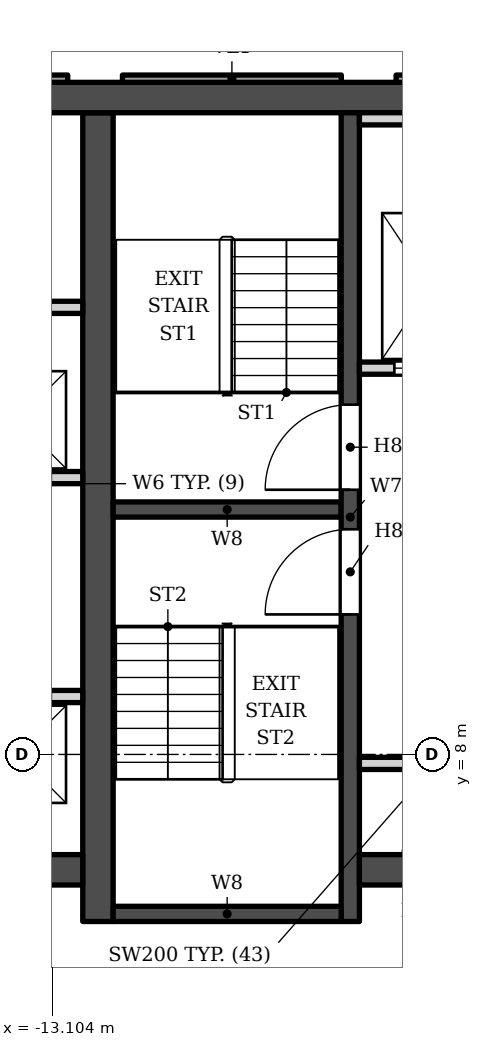
"""IFC4 building model, lengths in metres.
Left out: names, types, materials, properties, quantities, classifications, styles, units other than length and angle.
Written with IfcOpenShell. Run it as: python <this file> out.ifc"""

import sys

from ifc_helpers import new_model, si_unit, direction, frame, frame_2d, origin, place, context, subcontext, project, spatial, polyline, rectangle, outline, extrude, element, fill, save


model = new_model("IFC4")
c1 = context("Model", 3, precision=1e-05, world=origin(), true_north=direction((0.0, 1.0)))
c2 = subcontext(c1, "Body", "Model", "MODEL_VIEW")
j1 = project(units=[si_unit("LENGTHUNIT", "METRE"), si_unit("PLANEANGLEUNIT", "RADIAN")], contexts=[c1])
p1 = place(None, origin())
s1 = spatial("IfcSite", under=j1, at=p1, CompositionType="ELEMENT")
p2 = place(p1, origin())
s2 = spatial("IfcBuilding", under=s1, at=p2, CompositionType="ELEMENT")
p3 = place(p2, frame((0.0, 0.0, 122.4)))
s3 = spatial("IfcBuildingStorey", under=s2, at=p3, CompositionType="ELEMENT", Elevation=122.4)
p4 = place(p3, frame((-16.9, 18.802, 0.0), z_axis=(0.0, 0.0, 1.0), x_axis=(1.0, 0.0, 0.0)))
e1 = element("IfcWall", 1, at=p4, inside=s3, PredefinedType="SHEAR", context=c2, shape_type="SweptSolid", body=[
    extrude(rectangle(XDim=33.8, YDim=0.5, at=frame_2d((16.9, 0.0))), origin(), (0.0, 0.0, 1.0), 3.4),
])
p5 = place(p3, frame((-12.35, 5.253, 0.0), z_axis=(0.0, 0.0, 1.0), x_axis=(0.0, 1.0, 0.0)))
e2 = element("IfcWall", 2, at=p5, inside=s3, PredefinedType="SHEAR", context=c2, shape_type="SweptSolid", body=[
    extrude(rectangle(XDim=13.3, YDim=0.5, at=frame_2d((6.65, 0.0))), origin(), (0.0, 0.0, 1.0), 3.4),
])
p6 = place(p3, frame((-8.2, 5.253, 0.0), z_axis=(0.0, 0.0, 1.0), x_axis=(0.0, 1.0, 0.0)))
e3 = element("IfcWall", 3, at=p6, inside=s3, PredefinedType="SHEAR", context=c2, shape_type="SweptSolid", body=[
    extrude(rectangle(XDim=13.3, YDim=0.3, at=frame_2d((6.65, 0.0))), origin(), (0.0, 0.0, 1.0), 3.4),
])
p7 = place(p6, frame((7.1, 0.0, 0.0)))
e4 = element("IfcOpeningElement", 4, at=p7, cuts=e3, PredefinedType="OPENING", context=c2, shape_type="SweptSolid", body=[
    extrude(rectangle(XDim=1.4, YDim=2.1, at=frame_2d((0.7, 1.05))), frame((0.0, 0.16, 0.0), z_axis=(0.0, -1.0, 0.0), x_axis=(1.0, 0.0, 0.0)), (0.0, 0.0, 1.0), 0.32),
])
p8 = place(p6, frame((5.05, 0.0, 0.0)))
e5 = element("IfcOpeningElement", 5, at=p8, cuts=e3, PredefinedType="OPENING", context=c2, shape_type="SweptSolid", body=[
    extrude(rectangle(XDim=1.4, YDim=2.1, at=frame_2d((0.7, 1.05))), frame((0.0, 0.16, 0.0), z_axis=(0.0, -1.0, 0.0), x_axis=(1.0, 0.0, 0.0)), (0.0, 0.0, 1.0), 0.32),
])
for number, where, z_axis, x_axis in (
    (6, (-12.1, 12.028, 0.0), (0.0, 0.0, 1.0), (1.0, 0.0, 0.0)),
    (7, (-12.1, 5.378, 0.0), (0.0, 0.0, 1.0), (1.0, 0.0, 0.0)),
):
    element("IfcWall", number, at=place(p3, frame(where, z_axis=z_axis, x_axis=x_axis)), inside=s3, PredefinedType="SHEAR", context=c2, shape_type="SweptSolid", body=[
        extrude(rectangle(XDim=3.75, YDim=0.25, at=frame_2d((1.875, 0.0))), origin(), (0.0, 0.0, 1.0), 3.4),
    ])
p9 = place(p3, frame((-8.05, 6.103, 0.0), z_axis=(0.0, 0.0, 1.0), x_axis=(1.0, 0.0, 0.0)))
e8 = element("IfcWall", 8, at=p9, inside=s3, PredefinedType="SHEAR", context=c2, shape_type="SweptSolid", body=[
    extrude(rectangle(XDim=7.05, YDim=0.5, at=frame_2d((3.525, 0.0))), origin(), (0.0, 0.0, 1.0), 3.4),
])
p10 = place(p9, frame((0.825, 0.0, 0.0)))
e9 = element("IfcOpeningElement", 9, at=p10, cuts=e8, PredefinedType="OPENING", context=c2, shape_type="SweptSolid", body=[
    extrude(rectangle(XDim=0.9, YDim=2.1, at=frame_2d((0.45, 1.05))), frame((0.0, 0.26, 0.0), z_axis=(0.0, -1.0, 0.0), x_axis=(1.0, 0.0, 0.0)), (0.0, 0.0, 1.0), 0.52),
])
p11 = place(p3, frame((-12.6, 6.103, 0.0), z_axis=(0.0, 0.0, 1.0), x_axis=(-1.0, 0.0, 0.0)))
e10 = element("IfcWall", 10, at=p11, inside=s3, PredefinedType="SHEAR", context=c2, shape_type="SweptSolid", body=[
    extrude(rectangle(XDim=4.3, YDim=0.5, at=frame_2d((2.15, 0.0))), origin(), (0.0, 0.0, 1.0), 3.4),
])
p12 = place(p3, origin())
e11 = element("IfcWall", 11, at=p12, inside=s3, PredefinedType="SOLIDWALL", context=c2, shape_type="SweptSolid", body=[
    extrude(outline(polyline([(-7.447, 19.173), (-7.447, 19.052), (-3.847, 19.052), (-3.847, 19.173), (-7.447, 19.173)])), origin(), (0.0, 0.0, 1.0), 2.65),
])
p13 = place(p3, origin())
e12 = element("IfcWall", 12, at=p13, inside=s3, PredefinedType="ELEMENTEDWALL", context=c2, shape_type="SweptSolid", body=[
    extrude(outline(polyline([(-11.947, 19.173), (-11.947, 19.052), (-8.347, 19.052), (-8.347, 19.173), (-11.947, 19.173)])), origin(), (0.0, 0.0, 1.0), 2.65),
])
p14 = place(p3, origin())
e13 = element("IfcWall", 13, at=p14, inside=s3, PredefinedType="SOLIDWALL", context=c2, shape_type="SweptSolid", body=[
    extrude(outline(polyline([(-16.446, 19.173), (-16.446, 19.052), (-12.847, 19.052), (-12.847, 19.173), (-16.446, 19.173)])), origin(), (0.0, 0.0, 1.0), 2.65),
])
p15 = place(p3, frame((-8.05, 7.853, 0.0), z_axis=(0.0, 0.0, 1.0), x_axis=(1.0, 0.0, 0.0)))
e14 = element("IfcWall", 14, at=p15, inside=s3, PredefinedType="SOLIDWALL", context=c2, shape_type="SweptSolid", body=[
    extrude(rectangle(XDim=2.5, YDim=0.2, at=frame_2d((1.25, 0.0))), origin(), (0.0, 0.0, 1.0), 3.23),
])
p16 = place(p3, frame((-16.9, 8.953, 0.0), z_axis=(0.0, 0.0, 1.0), x_axis=(1.0, 0.0, 0.0)))
e15 = element("IfcWall", 15, at=p16, inside=s3, PredefinedType="SOLIDWALL", context=c2, shape_type="SweptSolid", body=[
    extrude(rectangle(XDim=4.3, YDim=0.2, at=frame_2d((2.15, 0.0))), origin(), (0.0, 0.0, 1.0), 3.23),
])
p17 = place(p16, frame((2.675, 0.0, 0.0)))
e16 = element("IfcOpeningElement", 16, at=p17, cuts=e15, PredefinedType="OPENING", context=c2, shape_type="SweptSolid", body=[
    extrude(rectangle(XDim=1.1, YDim=2.1, at=frame_2d((0.55, 1.05))), frame((0.0, 0.11, 0.0), z_axis=(0.0, -1.0, 0.0), x_axis=(1.0, 0.0, 0.0)), (0.0, 0.0, 1.0), 0.22),
])
p18 = place(p16, frame((0.425, 0.0, 0.0)))
e17 = element("IfcOpeningElement", 17, at=p18, cuts=e15, PredefinedType="OPENING", context=c2, shape_type="SweptSolid", body=[
    extrude(rectangle(XDim=1.1, YDim=2.1, at=frame_2d((0.55, 1.05))), frame((0.0, 0.11, 0.0), z_axis=(0.0, -1.0, 0.0), x_axis=(1.0, 0.0, 0.0)), (0.0, 0.0, 1.0), 0.22),
])
p19 = place(p3, frame((-16.9, 12.552, 0.0), z_axis=(0.0, 0.0, 1.0), x_axis=(1.0, 0.0, 0.0)))
e18 = element("IfcWall", 18, at=p19, inside=s3, PredefinedType="SOLIDWALL", context=c2, shape_type="SweptSolid", body=[
    extrude(rectangle(XDim=4.3, YDim=0.2, at=frame_2d((2.15, 0.0))), origin(), (0.0, 0.0, 1.0), 3.23),
])
p20 = place(p19, frame((2.675, 0.0, 0.0)))
e19 = element("IfcOpeningElement", 19, at=p20, cuts=e18, PredefinedType="OPENING", context=c2, shape_type="SweptSolid", body=[
    extrude(rectangle(XDim=1.1, YDim=2.1, at=frame_2d((0.55, 1.05))), frame((0.0, 0.11, 0.0), z_axis=(0.0, -1.0, 0.0), x_axis=(1.0, 0.0, 0.0)), (0.0, 0.0, 1.0), 0.22),
])
p21 = place(p19, frame((0.425, 0.0, 0.0)))
e20 = element("IfcOpeningElement", 20, at=p21, cuts=e18, PredefinedType="OPENING", context=c2, shape_type="SweptSolid", body=[
    extrude(rectangle(XDim=1.1, YDim=2.1, at=frame_2d((0.55, 1.05))), frame((0.0, 0.11, 0.0), z_axis=(0.0, -1.0, 0.0), x_axis=(1.0, 0.0, 0.0)), (0.0, 0.0, 1.0), 0.22),
])
p22 = place(p3, frame((-8.05, 14.353, 0.0), z_axis=(0.0, 0.0, 1.0), x_axis=(1.0, 0.0, 0.0)))
e21 = element("IfcWall", 21, at=p22, inside=s3, PredefinedType="SOLIDWALL", context=c2, shape_type="SweptSolid", body=[
    extrude(rectangle(XDim=2.35, YDim=0.2, at=frame_2d((1.175, 0.0))), origin(), (0.0, 0.0, 1.0), 3.23),
])
p23 = place(p22, frame((0.575, 0.0, 0.0)))
e22 = element("IfcOpeningElement", 22, at=p23, cuts=e21, PredefinedType="OPENING", context=c2, shape_type="SweptSolid", body=[
    extrude(rectangle(XDim=1.2, YDim=2.1, at=frame_2d((0.6, 1.05))), frame((0.0, 0.11, 0.0), z_axis=(0.0, -1.0, 0.0), x_axis=(1.0, 0.0, 0.0)), (0.0, 0.0, 1.0), 0.22),
])
p24 = place(p3, frame((-16.9, 15.353, 0.0), z_axis=(0.0, 0.0, 1.0), x_axis=(1.0, 0.0, 0.0)))
e23 = element("IfcWall", 23, at=p24, inside=s3, PredefinedType="SOLIDWALL", context=c2, shape_type="SweptSolid", body=[
    extrude(rectangle(XDim=4.3, YDim=0.2, at=frame_2d((2.15, 0.0))), origin(), (0.0, 0.0, 1.0), 3.23),
])
p25 = place(p3, frame((-8.05, 18.453, 0.0), z_axis=(0.0, 0.0, 1.0), x_axis=(1.0, 0.0, 0.0)))
e24 = element("IfcWall", 24, at=p25, inside=s3, PredefinedType="SOLIDWALL", context=c2, shape_type="SweptSolid", body=[
    extrude(rectangle(XDim=2.35, YDim=0.2, at=frame_2d((1.175, 0.0))), origin(), (0.0, 0.0, 1.0), 3.23),
])
p26 = place(p23, origin())
e25 = element("IfcDoor", 25, at=p26, inside=s3, OperationType="DOUBLE_DOOR_SLIDING", PredefinedType="DOOR", context=c2, shape_type="SweptSolid", body=[
    extrude(rectangle(XDim=1.2, YDim=2.1, at=frame_2d((0.6, 1.05))), frame((0.0, 0.025, 0.0), z_axis=(0.0, -1.0, 0.0), x_axis=(1.0, 0.0, 0.0)), (0.0, 0.0, 1.0), 0.05),
])
fill(e22, e25)
p27 = place(p7, origin())
e26 = element("IfcDoor", 26, at=p27, inside=s3, OperationType="SINGLE_SWING_LEFT", PredefinedType="DOOR", context=c2, shape_type="SweptSolid", body=[
    extrude(rectangle(XDim=1.4, YDim=2.1, at=frame_2d((0.7, 1.05))), frame((0.0, 0.025, 0.0), z_axis=(0.0, -1.0, 0.0), x_axis=(1.0, 0.0, 0.0)), (0.0, 0.0, 1.0), 0.05),
])
fill(e4, e26)
p28 = place(p8, origin())
e27 = element("IfcDoor", 27, at=p28, inside=s3, OperationType="SINGLE_SWING_LEFT", PredefinedType="DOOR", context=c2, shape_type="SweptSolid", body=[
    extrude(rectangle(XDim=1.4, YDim=2.1, at=frame_2d((0.7, 1.05))), frame((0.0, 0.025, 0.0), z_axis=(0.0, -1.0, 0.0), x_axis=(1.0, 0.0, 0.0)), (0.0, 0.0, 1.0), 0.05),
])
fill(e5, e27)
save(model, sys.argv[1])
